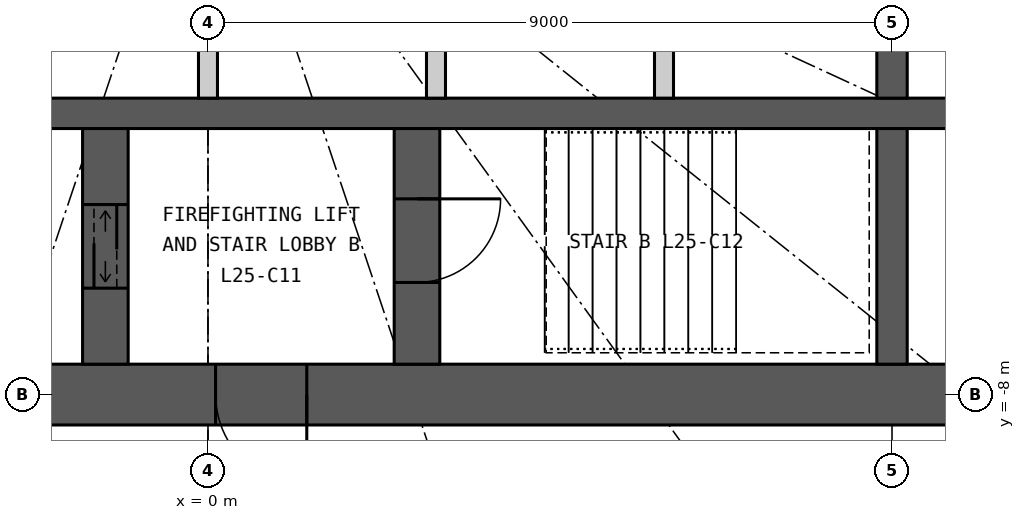
"""IFC4 building model, lengths in metres.
Left out: names, types, materials, properties, quantities, classifications, styles, units other than length and angle.
Written with IfcOpenShell. Run it as: python <this file> out.ifc"""

import sys

from ifc_helpers import new_model, si_unit, direction, frame, frame_2d, origin, place, context, subcontext, project, spatial, rectangle, extrude, element, fill, save


model = new_model("IFC4")
c1 = context("Model", 3, precision=1e-05, world=origin(), true_north=direction((0.0, 1.0)))
c2 = subcontext(c1, "Body", "Model", "MODEL_VIEW")
j1 = project(units=[si_unit("LENGTHUNIT", "METRE"), si_unit("PLANEANGLEUNIT", "RADIAN")], contexts=[c1])
p1 = place(None, origin())
s1 = spatial("IfcSite", under=j1, at=p1, CompositionType="ELEMENT")
p2 = place(p1, origin())
s2 = spatial("IfcBuilding", under=s1, at=p2, CompositionType="ELEMENT")
p3 = place(p2, frame((0.0, 0.0, 100.2)))
s3 = spatial("IfcBuildingStorey", under=s2, at=p3, CompositionType="ELEMENT", Elevation=100.2)
p4 = place(p3, frame((12.4, -8.0, 0.0), z_axis=(0.0, 0.0, 1.0), x_axis=(-1.0, 0.0, 0.0)))
e1 = element("IfcWall", 1, at=p4, inside=s3, PredefinedType="SHEAR", context=c2, shape_type="SweptSolid", body=[
    extrude(rectangle(XDim=24.8, YDim=0.8, at=frame_2d((12.4, 0.0))), origin(), (0.0, 0.0, 1.0), 5.4),
])
p5 = place(p4, frame((11.1, 0.0, 0.0)))
e2 = element("IfcOpeningElement", 2, at=p5, cuts=e1, PredefinedType="OPENING", context=c2, shape_type="SweptSolid", body=[
    extrude(rectangle(XDim=1.2, YDim=2.2, at=frame_2d((0.6, 1.1))), frame((0.0, 0.41, 0.0), z_axis=(0.0, -1.0, 0.0), x_axis=(1.0, 0.0, 0.0)), (0.0, 0.0, 1.0), 0.82),
])
p6 = place(p4, frame((18.7, 0.0, 0.0)))
e3 = element("IfcOpeningElement", 3, at=p6, cuts=e1, PredefinedType="OPENING", context=c2, shape_type="SweptSolid", body=[
    extrude(rectangle(XDim=0.9, YDim=2.2, at=frame_2d((0.45, 1.1))), frame((0.0, 0.41, 0.0), z_axis=(0.0, -1.0, 0.0), x_axis=(1.0, 0.0, 0.0)), (0.0, 0.0, 1.0), 0.82),
])
p7 = place(p3, frame((-11.6, -4.3, 0.0), z_axis=(0.0, 0.0, 1.0), x_axis=(1.0, 0.0, 0.0)))
e4 = element("IfcWall", 4, at=p7, inside=s3, PredefinedType="SHEAR", context=c2, shape_type="SweptSolid", body=[
    extrude(rectangle(XDim=23.2, YDim=0.4, at=frame_2d((11.6, 0.0))), origin(), (0.0, 0.0, 1.0), 5.4),
])
p8 = place(p3, frame((9.0, -4.1, 0.0), z_axis=(0.0, 0.0, 1.0), x_axis=(0.0, 1.0, 0.0)))
e5 = element("IfcWall", 5, at=p8, inside=s3, PredefinedType="SHEAR", context=c2, shape_type="SweptSolid", body=[
    extrude(rectangle(XDim=2.35, YDim=0.4, at=frame_2d((1.175, 0.0))), origin(), (0.0, 0.0, 1.0), 5.4),
])
p9 = place(p3, frame((9.0, -7.6, 0.0), z_axis=(0.0, 0.0, 1.0), x_axis=(0.0, 1.0, 0.0)))
e6 = element("IfcWall", 6, at=p9, inside=s3, PredefinedType="SHEAR", context=c2, shape_type="SweptSolid", body=[
    extrude(rectangle(XDim=3.1, YDim=0.4, at=frame_2d((1.55, 0.0))), origin(), (0.0, 0.0, 1.0), 5.4),
])
p10 = place(p3, frame((2.75, -7.6, 0.0), z_axis=(0.0, 0.0, 1.0), x_axis=(0.0, 1.0, 0.0)))
e7 = element("IfcWall", 7, at=p10, inside=s3, PredefinedType="SHEAR", context=c2, shape_type="SweptSolid", body=[
    extrude(rectangle(XDim=3.1, YDim=0.6, at=frame_2d((1.55, 0.0))), origin(), (0.0, 0.0, 1.0), 5.4),
])
p11 = place(p10, frame((1.075, 0.0, 0.0)))
e8 = element("IfcOpeningElement", 8, at=p11, cuts=e7, PredefinedType="OPENING", context=c2, shape_type="SweptSolid", body=[
    extrude(rectangle(XDim=1.1, YDim=2.2, at=frame_2d((0.55, 1.1))), frame((0.0, 0.31, 0.0), z_axis=(0.0, -1.0, 0.0), x_axis=(1.0, 0.0, 0.0)), (0.0, 0.0, 1.0), 0.62),
])
p12 = place(p3, frame((-1.35, -7.6, 0.0), z_axis=(0.0, 0.0, 1.0), x_axis=(0.0, 1.0, 0.0)))
e9 = element("IfcWall", 9, at=p12, inside=s3, PredefinedType="SHEAR", context=c2, shape_type="SweptSolid", body=[
    extrude(rectangle(XDim=3.1, YDim=0.6, at=frame_2d((1.55, 0.0))), origin(), (0.0, 0.0, 1.0), 5.4),
])
p13 = place(p12, frame((1.0, 0.0, 0.0)))
e10 = element("IfcOpeningElement", 10, at=p13, cuts=e9, PredefinedType="OPENING", context=c2, shape_type="SweptSolid", body=[
    extrude(rectangle(XDim=1.1, YDim=2.2, at=frame_2d((0.55, 1.1))), frame((0.0, 0.31, 0.0), z_axis=(0.0, -1.0, 0.0), x_axis=(1.0, 0.0, 0.0)), (0.0, 0.0, 1.0), 0.62),
])
for number, where, z_axis, x_axis in (
    (11, (0.0, -4.1, 0.0), (0.0, 0.0, 1.0), (0.0, 1.0, 0.0)),
    (12, (3.0, -4.1, 0.0), (0.0, 0.0, 1.0), (0.0, 1.0, 0.0)),
    (13, (6.0, -4.1, 0.0), (0.0, 0.0, 1.0), (0.0, 1.0, 0.0)),
):
    element("IfcWall", number, at=place(p3, frame(where, z_axis=z_axis, x_axis=x_axis)), inside=s3, PredefinedType="PARTITIONING", context=c2, shape_type="SweptSolid", body=[
        extrude(rectangle(XDim=2.35, YDim=0.25, at=frame_2d((1.175, 0.0))), origin(), (0.0, 0.0, 1.0), 5.4),
    ])
p14 = place(p5, origin())
e14 = element("IfcDoor", 14, at=p14, inside=s3, OperationType="SINGLE_SWING_LEFT", PredefinedType="DOOR", context=c2, shape_type="SweptSolid", body=[
    extrude(rectangle(XDim=1.2, YDim=2.2, at=frame_2d((0.6, 1.1))), frame((0.0, 0.025, 0.0), z_axis=(0.0, -1.0, 0.0), x_axis=(1.0, 0.0, 0.0)), (0.0, 0.0, 1.0), 0.05),
])
fill(e2, e14)
p15 = place(p11, origin())
e15 = element("IfcDoor", 15, at=p15, inside=s3, OperationType="SINGLE_SWING_RIGHT", PredefinedType="DOOR", context=c2, shape_type="SweptSolid", body=[
    extrude(rectangle(XDim=1.1, YDim=2.2, at=frame_2d((0.55, 1.1))), frame((0.0, 0.025, 0.0), z_axis=(0.0, -1.0, 0.0), x_axis=(1.0, 0.0, 0.0)), (0.0, 0.0, 1.0), 0.05),
])
fill(e8, e15)
p16 = place(p13, origin())
e16 = element("IfcDoor", 16, at=p16, inside=s3, OperationType="DOUBLE_DOOR_SLIDING", PredefinedType="DOOR", context=c2, shape_type="SweptSolid", body=[
    extrude(rectangle(XDim=1.1, YDim=2.2, at=frame_2d((0.55, 1.1))), frame((0.0, 0.025, 0.0), z_axis=(0.0, -1.0, 0.0), x_axis=(1.0, 0.0, 0.0)), (0.0, 0.0, 1.0), 0.05),
])
fill(e10, e16)
save(model, sys.argv[1])
